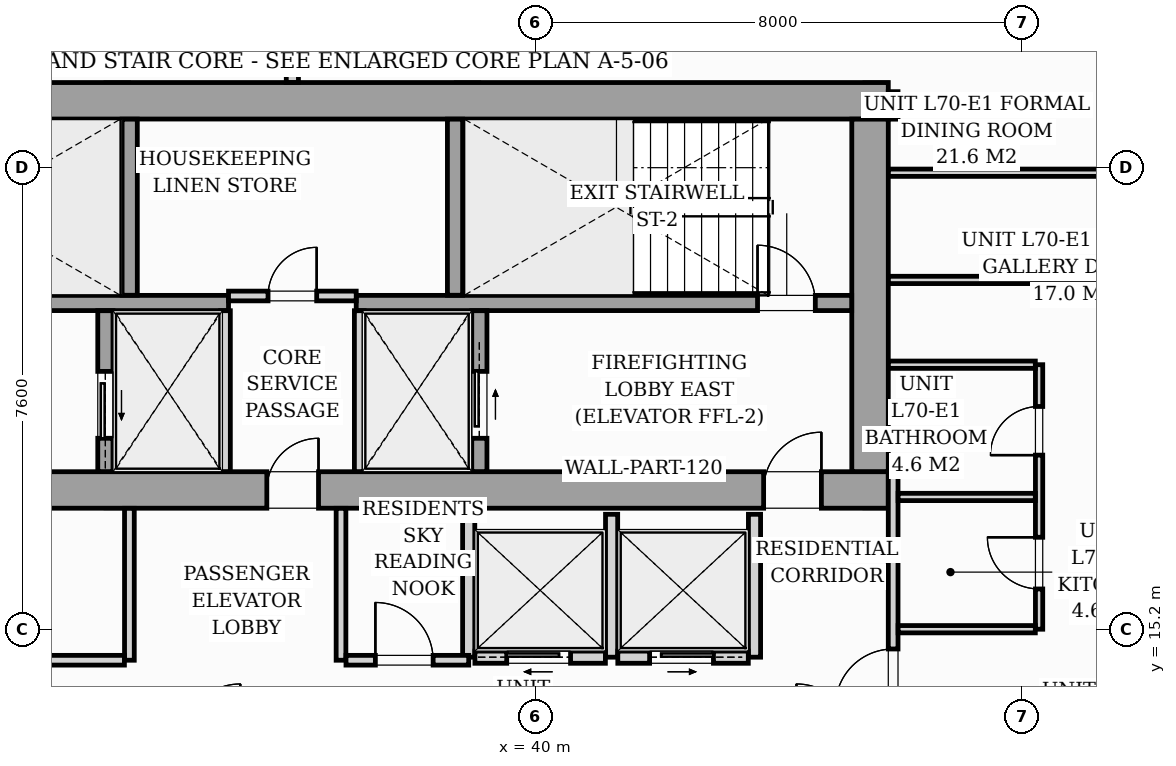
"""IFC4 building model, lengths in metres.
Left out: names, types, materials, properties, quantities, classifications, styles, units other than length and angle.
Written with IfcOpenShell. Run it as: python <this file> out.ifc"""

import sys

from ifc_helpers import new_model, si_unit, direction, frame, frame_2d, origin, origin_2d, place, context, subcontext, project, spatial, rectangle, i_section, extrude, source, transform, mapped, element, fill, save


model = new_model("IFC4")
c1 = context("Model", 3, precision=1e-05, world=origin(), true_north=direction((0.0, 1.0)))
c2 = subcontext(c1, "Body", "Model", "MODEL_VIEW")
j1 = project(units=[si_unit("LENGTHUNIT", "METRE"), si_unit("PLANEANGLEUNIT", "RADIAN")], contexts=[c1])
p1 = place(None, origin())
s1 = spatial("IfcSite", under=j1, at=p1, CompositionType="ELEMENT")
p2 = place(p1, origin())
s2 = spatial("IfcBuilding", under=s1, at=p2, CompositionType="ELEMENT")
p3 = place(p2, frame((0.0, 0.0, 243.0)))
s3 = spatial("IfcBuildingStorey", under=s2, at=p3, CompositionType="ELEMENT", Elevation=243.0)
m1 = source(origin(), c2, "Body", "SweptSolid", [
    extrude(i_section(OverallWidth=0.409, OverallDepth=0.425, WebThickness=0.033, FlangeThickness=0.052, FilletRadius=0.018, at=origin_2d()), origin(), (0.0, 0.0, 1.0), 3.296),
])
for number, where, z_axis, x_axis in (
    (1, (33.12, 17.4, 0.002), (0.0, 0.0, 1.0), (1.0, 0.0, 0.0)),
    (2, (38.88, 17.4, 0.002), (0.0, 0.0, 1.0), (1.0, 0.0, 0.0)),
    (3, (45.6, 17.4, 0.002), (0.0, 0.0, 1.0), (1.0, 0.0, 0.0)),
    (4, (33.12, 24.0, 0.002), (0.0, 0.0, 1.0), (1.0, 0.0, 0.0)),
    (5, (38.88, 24.0, 0.002), (0.0, 0.0, 1.0), (1.0, 0.0, 0.0)),
    (6, (45.6, 24.0, 0.002), (0.0, 0.0, 1.0), (1.0, 0.0, 0.0)),
):
    element("IfcColumn", number, at=place(p3, frame(where, z_axis=z_axis, x_axis=x_axis)), inside=s3, PredefinedType="PILASTER", context=c2, shape_type="MappedRepresentation", body=[
        mapped(m1, transform((0.0, 0.0, 0.0), scale=1.0)),
    ])
p4 = place(p3, frame((26.2, 17.5, 0.0), z_axis=(0.0, 0.0, 1.0), x_axis=(1.0, 0.0, 0.0)))
e7 = element("IfcWall", 7, at=p4, inside=s3, PredefinedType="SHEAR", context=c2, shape_type="SweptSolid", body=[
    extrude(rectangle(XDim=19.6, YDim=0.6, at=frame_2d((9.8, 0.0))), origin(), (0.0, 0.0, 1.0), 3.3),
])
p5 = place(p4, frame((0.95, 0.0, 0.0)))
e8 = element("IfcOpeningElement", 8, at=p5, cuts=e7, PredefinedType="OPENING", context=c2, shape_type="SweptSolid", body=[
    extrude(rectangle(XDim=0.95, YDim=2.06, at=frame_2d((0.475, 1.03))), frame((0.0, 0.31, 0.0), z_axis=(0.0, -1.0, 0.0), x_axis=(1.0, 0.0, 0.0)), (0.0, 0.0, 1.0), 0.62),
])
p6 = place(p4, frame((9.38, 0.0, 0.0)))
e9 = element("IfcOpeningElement", 9, at=p6, cuts=e7, PredefinedType="OPENING", context=c2, shape_type="SweptSolid", body=[
    extrude(rectangle(XDim=0.85, YDim=2.0, at=frame_2d((0.425, 1.0))), frame((0.0, 0.31, 0.0), z_axis=(0.0, -1.0, 0.0), x_axis=(1.0, 0.0, 0.0)), (0.0, 0.0, 1.0), 0.62),
])
p7 = place(p4, frame((17.55, 0.0, 0.0)))
e10 = element("IfcOpeningElement", 10, at=p7, cuts=e7, PredefinedType="OPENING", context=c2, shape_type="SweptSolid", body=[
    extrude(rectangle(XDim=0.95, YDim=2.06, at=frame_2d((0.475, 1.03))), frame((0.0, 0.31, 0.0), z_axis=(0.0, -1.0, 0.0), x_axis=(1.0, 0.0, 0.0)), (0.0, 0.0, 1.0), 0.62),
])
p8 = place(p3, frame((26.2, 23.9, 0.0), z_axis=(0.0, 0.0, 1.0), x_axis=(1.0, 0.0, 0.0)))
e11 = element("IfcWall", 11, at=p8, inside=s3, PredefinedType="SHEAR", context=c2, shape_type="SweptSolid", body=[
    extrude(rectangle(XDim=19.6, YDim=0.6, at=frame_2d((9.8, 0.0))), origin(), (0.0, 0.0, 1.0), 3.3),
])
p9 = place(p3, frame((45.5, 17.802, 0.0), z_axis=(0.0, 0.0, 1.0), x_axis=(0.0, 1.0, 0.0)))
e12 = element("IfcWall", 12, at=p9, inside=s3, PredefinedType="SHEAR", context=c2, shape_type="SweptSolid", body=[
    extrude(rectangle(XDim=5.796, YDim=0.6, at=frame_2d((2.898, 0.0))), origin(), (0.0, 0.0, 1.0), 3.3),
])
p10 = place(p3, frame((26.802, 20.575, 0.0), z_axis=(0.0, 0.0, 1.0), x_axis=(1.0, 0.0, 0.0)))
e13 = element("IfcWall", 13, at=p10, inside=s3, PredefinedType="SOLIDWALL", context=c2, shape_type="SweptSolid", body=[
    extrude(rectangle(XDim=8.148, YDim=0.25, at=frame_2d((4.074, 0.0))), origin(), (0.0, 0.0, 1.0), 3.3),
])
p11 = place(p10, frame((0.298, 0.0, 0.0)))
e14 = element("IfcOpeningElement", 14, at=p11, cuts=e13, PredefinedType="OPENING", context=c2, shape_type="SweptSolid", body=[
    extrude(rectangle(XDim=0.95, YDim=2.06, at=frame_2d((0.475, 1.03))), frame((0.0, 0.135, 0.0), z_axis=(0.0, -1.0, 0.0), x_axis=(1.0, 0.0, 0.0)), (0.0, 0.0, 1.0), 0.27),
])
p12 = place(p3, frame((37.05, 20.575, 0.0), z_axis=(0.0, 0.0, 1.0), x_axis=(1.0, 0.0, 0.0)))
e15 = element("IfcWall", 15, at=p12, inside=s3, PredefinedType="SOLIDWALL", context=c2, shape_type="SweptSolid", body=[
    extrude(rectangle(XDim=8.148, YDim=0.25, at=frame_2d((4.074, 0.0))), origin(), (0.0, 0.0, 1.0), 3.3),
])
p13 = place(p12, frame((6.6, 0.0, 0.0)))
e16 = element("IfcOpeningElement", 16, at=p13, cuts=e15, PredefinedType="OPENING", context=c2, shape_type="SweptSolid", body=[
    extrude(rectangle(XDim=0.95, YDim=2.06, at=frame_2d((0.475, 1.03))), frame((0.0, 0.135, 0.0), z_axis=(0.0, -1.0, 0.0), x_axis=(1.0, 0.0, 0.0)), (0.0, 0.0, 1.0), 0.27),
])
for number, where, z_axis, x_axis in (
    (17, (33.325, 20.702, 0.0), (0.0, 0.0, 1.0), (0.0, 1.0, 0.0)),
    (18, (38.675, 20.702, 0.0), (0.0, 0.0, 1.0), (0.0, 1.0, 0.0)),
):
    element("IfcWall", number, at=place(p3, frame(where, z_axis=z_axis, x_axis=x_axis)), inside=s3, PredefinedType="SOLIDWALL", context=c2, shape_type="SweptSolid", body=[
        extrude(rectangle(XDim=2.896, YDim=0.25, at=frame_2d((1.448, 0.0))), origin(), (0.0, 0.0, 1.0), 3.3),
    ])
p14 = place(p3, frame((32.925, 17.802, 0.0), z_axis=(0.0, 0.0, 1.0), x_axis=(0.0, 1.0, 0.0)))
e19 = element("IfcWall", 19, at=p14, inside=s3, PredefinedType="SOLIDWALL", context=c2, shape_type="SweptSolid", body=[
    extrude(rectangle(XDim=2.646, YDim=0.25, at=frame_2d((1.323, 0.0))), origin(), (0.0, 0.0, 1.0), 3.3),
])
p15 = place(p14, frame((0.548, 0.0, 0.0)))
e20 = element("IfcOpeningElement", 20, at=p15, cuts=e19, PredefinedType="OPENING", context=c2, shape_type="SweptSolid", body=[
    extrude(rectangle(XDim=1.1, YDim=2.08, at=frame_2d((0.55, 1.04))), frame((0.0, 0.135, 0.0), z_axis=(0.0, -1.0, 0.0), x_axis=(1.0, 0.0, 0.0)), (0.0, 0.0, 1.0), 0.27),
])
for number, where, z_axis, x_axis in (
    (21, (34.9, 17.802, 0.0), (0.0, 0.0, 1.0), (0.0, 1.0, 0.0)),
    (22, (37.1, 17.802, 0.0), (0.0, 0.0, 1.0), (0.0, 1.0, 0.0)),
):
    element("IfcWall", number, at=place(p3, frame(where, z_axis=z_axis, x_axis=x_axis)), inside=s3, PredefinedType="PARTITIONING", context=c2, shape_type="SweptSolid", body=[
        extrude(rectangle(XDim=2.646, YDim=0.16, at=frame_2d((1.323, 0.0))), origin(), (0.0, 0.0, 1.0), 3.04),
    ])
p16 = place(p3, frame((39.075, 17.802, 0.0), z_axis=(0.0, 0.0, 1.0), x_axis=(0.0, 1.0, 0.0)))
e23 = element("IfcWall", 23, at=p16, inside=s3, PredefinedType="SOLIDWALL", context=c2, shape_type="SweptSolid", body=[
    extrude(rectangle(XDim=2.646, YDim=0.25, at=frame_2d((1.323, 0.0))), origin(), (0.0, 0.0, 1.0), 3.3),
])
p17 = place(p16, frame((0.548, 0.0, 0.0)))
e24 = element("IfcOpeningElement", 24, at=p17, cuts=e23, PredefinedType="OPENING", context=c2, shape_type="SweptSolid", body=[
    extrude(rectangle(XDim=1.1, YDim=2.08, at=frame_2d((0.55, 1.04))), frame((0.0, 0.135, 0.0), z_axis=(0.0, -1.0, 0.0), x_axis=(1.0, 0.0, 0.0)), (0.0, 0.0, 1.0), 0.27),
])
p18 = place(p3, frame((34.95, 20.69, 0.0), z_axis=(0.0, 0.0, 1.0), x_axis=(1.0, 0.0, 0.0)))
e25 = element("IfcWall", 25, at=p18, inside=s3, PredefinedType="PARTITIONING", context=c2, shape_type="SweptSolid", body=[
    extrude(rectangle(XDim=2.1, YDim=0.16, at=frame_2d((1.05, 0.0))), origin(), (0.0, 0.0, 1.0), 3.04),
])
p19 = place(p18, frame((0.65, 0.0, 0.0)))
e26 = element("IfcOpeningElement", 26, at=p19, cuts=e25, PredefinedType="OPENING", context=c2, shape_type="SweptSolid", body=[
    extrude(rectangle(XDim=0.8, YDim=2.05, at=frame_2d((0.4, 1.025))), frame((0.0, 0.09, 0.0), z_axis=(0.0, -1.0, 0.0), x_axis=(1.0, 0.0, 0.0)), (0.0, 0.0, 1.0), 0.18),
])
for number, where, z_axis, x_axis in (
    (27, (38.9, 14.75, 0.0), (0.0, 0.0, 1.0), (0.0, 1.0, 0.0)),
    (28, (41.25, 14.75, 0.0), (0.0, 0.0, 1.0), (0.0, 1.0, 0.0)),
    (29, (43.6, 14.75, 0.0), (0.0, 0.0, 1.0), (0.0, 1.0, 0.0)),
):
    element("IfcWall", number, at=place(p3, frame(where, z_axis=z_axis, x_axis=x_axis)), inside=s3, PredefinedType="PARTITIONING", context=c2, shape_type="SweptSolid", body=[
        extrude(rectangle(XDim=2.35, YDim=0.2, at=frame_2d((1.175, 0.0))), origin(), (0.0, 0.0, 1.0), 3.04),
    ])
p20 = place(p3, frame((39.002, 14.75, 0.0), z_axis=(0.0, 0.0, 1.0), x_axis=(1.0, 0.0, 0.0)))
e30 = element("IfcWall", 30, at=p20, inside=s3, PredefinedType="PARTITIONING", context=c2, shape_type="SweptSolid", body=[
    extrude(rectangle(XDim=2.146, YDim=0.2, at=frame_2d((1.073, 0.0))), origin(), (0.0, 0.0, 1.0), 3.04),
])
p21 = place(p20, frame((0.523, 0.0, 0.0)))
e31 = element("IfcOpeningElement", 31, at=p21, cuts=e30, PredefinedType="OPENING", context=c2, shape_type="SweptSolid", body=[
    extrude(rectangle(XDim=1.05, YDim=2.08, at=frame_2d((0.525, 1.04))), frame((0.0, 0.11, 0.0), z_axis=(0.0, -1.0, 0.0), x_axis=(1.0, 0.0, 0.0)), (0.0, 0.0, 1.0), 0.22),
])
p22 = place(p3, frame((41.352, 14.75, 0.0), z_axis=(0.0, 0.0, 1.0), x_axis=(1.0, 0.0, 0.0)))
e32 = element("IfcWall", 32, at=p22, inside=s3, PredefinedType="PARTITIONING", context=c2, shape_type="SweptSolid", body=[
    extrude(rectangle(XDim=2.146, YDim=0.2, at=frame_2d((1.073, 0.0))), origin(), (0.0, 0.0, 1.0), 3.04),
])
p23 = place(p22, frame((0.523, 0.0, 0.0)))
e33 = element("IfcOpeningElement", 33, at=p23, cuts=e32, PredefinedType="OPENING", context=c2, shape_type="SweptSolid", body=[
    extrude(rectangle(XDim=1.05, YDim=2.08, at=frame_2d((0.525, 1.04))), frame((0.0, 0.11, 0.0), z_axis=(0.0, -1.0, 0.0), x_axis=(1.0, 0.0, 0.0)), (0.0, 0.0, 1.0), 0.22),
])
p24 = place(p3, frame((45.88, 13.442, 0.0), z_axis=(0.0, 0.0, 1.0), x_axis=(0.0, 1.0, 0.0)))
e34 = element("IfcWall", 34, at=p24, inside=s3, PredefinedType="PARTITIONING", context=c2, shape_type="SweptSolid", body=[
    extrude(rectangle(XDim=4.36, YDim=0.16, at=frame_2d((2.18, 0.0))), origin(), (0.0, 0.0, 1.0), 3.04),
])
p25 = place(p24, frame((0.493, 0.0, 0.0)))
e35 = element("IfcOpeningElement", 35, at=p25, cuts=e34, PredefinedType="OPENING", context=c2, shape_type="SweptSolid", body=[
    extrude(rectangle(XDim=0.95, YDim=2.06, at=frame_2d((0.475, 1.03))), frame((0.0, 0.09, 0.0), z_axis=(0.0, -1.0, 0.0), x_axis=(1.0, 0.0, 0.0)), (0.0, 0.0, 1.0), 0.18),
])
p26 = place(p3, frame((45.88, 23.598, 0.0), z_axis=(0.0, 0.0, 1.0), x_axis=(0.0, 1.0, 0.0)))
e36 = element("IfcWall", 36, at=p26, inside=s3, PredefinedType="PARTITIONING", context=c2, shape_type="SweptSolid", body=[
    extrude(rectangle(XDim=0.452, YDim=0.16, at=frame_2d((0.226, 0.0))), origin(), (0.0, 0.0, 1.0), 3.04),
])
p27 = place(p3, frame((36.0, 24.202, 0.0), z_axis=(0.0, 0.0, 1.0), x_axis=(0.0, 1.0, 0.0)))
e37 = element("IfcWall", 37, at=p27, inside=s3, PredefinedType="PARTITIONING", context=c2, shape_type="SweptSolid", body=[
    extrude(rectangle(XDim=2.363, YDim=0.2, at=frame_2d((1.182, 0.0))), origin(), (0.0, 0.0, 1.0), 3.04),
])
p28 = place(p3, frame((48.28, 15.21, 0.0), z_axis=(0.0, 0.0, 1.0), x_axis=(0.0, 1.0, 0.0)))
e38 = element("IfcWall", 38, at=p28, inside=s3, PredefinedType="PARTITIONING", context=c2, shape_type="SweptSolid", body=[
    extrude(rectangle(XDim=4.35, YDim=0.12, at=frame_2d((2.175, 0.0))), origin(), (0.0, 0.0, 1.0), 3.04),
])
p29 = place(p28, frame((0.662, 0.0, 0.0)))
e39 = element("IfcOpeningElement", 39, at=p29, cuts=e38, PredefinedType="OPENING", context=c2, shape_type="SweptSolid", body=[
    extrude(rectangle(XDim=0.85, YDim=2.05, at=frame_2d((0.425, 1.025))), frame((0.0, 0.07, 0.0), z_axis=(0.0, -1.0, 0.0), x_axis=(1.0, 0.0, 0.0)), (0.0, 0.0, 1.0), 0.14),
])
p30 = place(p28, frame((2.863, 0.0, 0.0)))
e40 = element("IfcOpeningElement", 40, at=p30, cuts=e38, PredefinedType="OPENING", context=c2, shape_type="SweptSolid", body=[
    extrude(rectangle(XDim=0.8, YDim=2.02, at=frame_2d((0.4, 1.01))), frame((0.0, 0.07, 0.0), z_axis=(0.0, -1.0, 0.0), x_axis=(1.0, 0.0, 0.0)), (0.0, 0.0, 1.0), 0.14),
])
p31 = place(p3, frame((45.962, 17.385, 0.0), z_axis=(0.0, 0.0, 1.0), x_axis=(1.0, 0.0, 0.0)))
e41 = element("IfcWall", 41, at=p31, inside=s3, PredefinedType="PARTITIONING", context=c2, shape_type="SweptSolid", body=[
    extrude(rectangle(XDim=2.256, YDim=0.12, at=frame_2d((1.128, 0.0))), origin(), (0.0, 0.0, 1.0), 2.381),
])
p32 = place(p3, frame((45.962, 15.21, 0.0), z_axis=(0.0, 0.0, 1.0), x_axis=(1.0, 0.0, 0.0)))
e42 = element("IfcWall", 42, at=p32, inside=s3, PredefinedType="PARTITIONING", context=c2, shape_type="SweptSolid", body=[
    extrude(rectangle(XDim=2.256, YDim=0.12, at=frame_2d((1.128, 0.0))), origin(), (0.0, 0.0, 1.0), 3.04),
])
p33 = place(p3, frame((45.802, 19.56, 0.0), z_axis=(0.0, 0.0, 1.0), x_axis=(1.0, 0.0, 0.0)))
e43 = element("IfcWall", 43, at=p33, inside=s3, PredefinedType="PARTITIONING", context=c2, shape_type="SweptSolid", body=[
    extrude(rectangle(XDim=2.416, YDim=0.12, at=frame_2d((1.208, 0.0))), origin(), (0.0, 0.0, 1.0), 3.04),
])
p34 = place(p3, frame((45.802, 22.717, 0.0), z_axis=(0.0, 0.0, 1.0), x_axis=(1.0, 0.0, 0.0)))
e44 = element("IfcWall", 44, at=p34, inside=s3, PredefinedType="PARTITIONING", context=c2, shape_type="SweptSolid", body=[
    extrude(rectangle(XDim=9.406, YDim=0.12, at=frame_2d((4.703, 0.0))), origin(), (0.0, 0.0, 1.0), 3.04),
])
p35 = place(p34, frame((4.397, 0.0, 0.0)))
e45 = element("IfcOpeningElement", 45, at=p35, cuts=e44, PredefinedType="OPENING", context=c2, shape_type="SweptSolid", body=[
    extrude(rectangle(XDim=0.85, YDim=2.05, at=frame_2d((0.425, 1.025))), frame((0.0, 0.07, 0.0), z_axis=(0.0, -1.0, 0.0), x_axis=(1.0, 0.0, 0.0)), (0.0, 0.0, 1.0), 0.14),
])
p36 = place(p3, frame((45.802, 20.954, 0.0), z_axis=(0.0, 0.0, 1.0), x_axis=(1.0, 0.0, 0.0)))
e46 = element("IfcWall", 46, at=p36, inside=s3, PredefinedType="PARTITIONING", context=c2, shape_type="SweptSolid", body=[
    extrude(rectangle(XDim=10.683, YDim=0.12, at=frame_2d((5.342, 0.0))), origin(), (0.0, 0.0, 1.0), 3.04),
])
p37 = place(p36, frame((5.062, 0.0, 0.0)))
e47 = element("IfcOpeningElement", 47, at=p37, cuts=e46, PredefinedType="OPENING", context=c2, shape_type="SweptSolid", body=[
    extrude(rectangle(XDim=0.85, YDim=2.05, at=frame_2d((0.425, 1.025))), frame((0.0, 0.07, 0.0), z_axis=(0.0, -1.0, 0.0), x_axis=(1.0, 0.0, 0.0)), (0.0, 0.0, 1.0), 0.14),
])
p38 = place(p3, frame((33.32, 14.7, 0.0), z_axis=(0.0, 0.0, 1.0), x_axis=(0.0, 1.0, 0.0)))
e48 = element("IfcWall", 48, at=p38, inside=s3, PredefinedType="PARTITIONING", context=c2, shape_type="SweptSolid", body=[
    extrude(rectangle(XDim=2.498, YDim=0.16, at=frame_2d((1.249, 0.0))), origin(), (0.0, 0.0, 1.0), 3.04),
])
p39 = place(p3, frame((28.442, 14.7, 0.0), z_axis=(0.0, 0.0, 1.0), x_axis=(1.0, 0.0, 0.0)))
e49 = element("IfcWall", 49, at=p39, inside=s3, PredefinedType="PARTITIONING", context=c2, shape_type="SweptSolid", body=[
    extrude(rectangle(XDim=4.796, YDim=0.16, at=frame_2d((2.398, 0.0))), origin(), (0.0, 0.0, 1.0), 2.55),
])
p40 = place(p39, frame((1.923, 0.0, 0.0)))
e50 = element("IfcOpeningElement", 50, at=p40, cuts=e49, PredefinedType="OPENING", context=c2, shape_type="SweptSolid", body=[
    extrude(rectangle(XDim=0.95, YDim=2.06, at=frame_2d((0.475, 1.03))), frame((0.0, 0.09, 0.0), z_axis=(0.0, -1.0, 0.0), x_axis=(1.0, 0.0, 0.0)), (0.0, 0.0, 1.0), 0.18),
])
p41 = place(p3, frame((36.8, 14.7, 0.0), z_axis=(0.0, 0.0, 1.0), x_axis=(0.0, 1.0, 0.0)))
e51 = element("IfcWall", 51, at=p41, inside=s3, PredefinedType="PARTITIONING", context=c2, shape_type="SweptSolid", body=[
    extrude(rectangle(XDim=2.498, YDim=0.16, at=frame_2d((1.249, 0.0))), origin(), (0.0, 0.0, 1.0), 3.04),
])
p42 = place(p3, frame((36.882, 14.7, 0.0), z_axis=(0.0, 0.0, 1.0), x_axis=(1.0, 0.0, 0.0)))
e52 = element("IfcWall", 52, at=p42, inside=s3, PredefinedType="PARTITIONING", context=c2, shape_type="SweptSolid", body=[
    extrude(rectangle(XDim=2.018, YDim=0.16, at=frame_2d((1.009, 0.0))), origin(), (0.0, 0.0, 1.0), 3.04),
])
p43 = place(p42, frame((0.483, 0.0, 0.0)))
e53 = element("IfcOpeningElement", 53, at=p43, cuts=e52, PredefinedType="OPENING", context=c2, shape_type="SweptSolid", body=[
    extrude(rectangle(XDim=0.95, YDim=2.06, at=frame_2d((0.475, 1.03))), frame((0.0, 0.09, 0.0), z_axis=(0.0, -1.0, 0.0), x_axis=(1.0, 0.0, 0.0)), (0.0, 0.0, 1.0), 0.18),
])
m2 = source(origin(), c2, "Body", "SweptSolid", [
    extrude(rectangle(XDim=0.85, YDim=2.0, at=frame_2d((0.425, 1.0))), frame((0.0, 0.025, 0.0), z_axis=(0.0, -1.0, 0.0), x_axis=(1.0, 0.0, 0.0)), (0.0, 0.0, 1.0), 0.05),
])
p44 = place(p6, origin())
e54 = element("IfcDoor", 54, at=p44, inside=s3, OperationType="SINGLE_SWING_RIGHT", PredefinedType="DOOR", context=c2, shape_type="MappedRepresentation", body=[
    mapped(m2, transform((0.0, 0.0, 0.0), scale=1.0)),
])
fill(e9, e54)
m3 = source(origin(), c2, "Body", "SweptSolid", [
    extrude(rectangle(XDim=0.95, YDim=2.06, at=frame_2d((0.475, 1.03))), frame((0.0, 0.025, 0.0), z_axis=(0.0, -1.0, 0.0), x_axis=(1.0, 0.0, 0.0)), (0.0, 0.0, 1.0), 0.05),
])
p45 = place(p7, origin())
e55 = element("IfcDoor", 55, at=p45, inside=s3, OperationType="SINGLE_SWING_RIGHT", PredefinedType="DOOR", context=c2, shape_type="MappedRepresentation", body=[
    mapped(m3, transform((0.0, 0.0, 0.0), scale=1.0)),
])
fill(e10, e55)
p46 = place(p13, origin())
e56 = element("IfcDoor", 56, at=p46, inside=s3, OperationType="SINGLE_SWING_LEFT", PredefinedType="DOOR", context=c2, shape_type="MappedRepresentation", body=[
    mapped(m3, transform((0.0, 0.0, 0.0), scale=1.0)),
])
fill(e16, e56)
m4 = source(origin(), c2, "Body", "SweptSolid", [
    extrude(rectangle(XDim=1.1, YDim=2.08, at=frame_2d((0.55, 1.04))), frame((0.0, 0.025, 0.0), z_axis=(0.0, -1.0, 0.0), x_axis=(1.0, 0.0, 0.0)), (0.0, 0.0, 1.0), 0.05),
])
p47 = place(p15, origin())
e57 = element("IfcDoor", 57, at=p47, inside=s3, OperationType="SLIDING_TO_LEFT", PredefinedType="DOOR", context=c2, shape_type="MappedRepresentation", body=[
    mapped(m4, transform((0.0, 0.0, 0.0), scale=1.0)),
])
fill(e20, e57)
p48 = place(p17, origin())
e58 = element("IfcDoor", 58, at=p48, inside=s3, OperationType="SLIDING_TO_RIGHT", PredefinedType="DOOR", context=c2, shape_type="MappedRepresentation", body=[
    mapped(m4, transform((0.0, 0.0, 0.0), scale=1.0)),
])
fill(e24, e58)
m5 = source(origin(), c2, "Body", "SweptSolid", [
    extrude(rectangle(XDim=0.8, YDim=2.05, at=frame_2d((0.4, 1.025))), frame((0.0, 0.025, 0.0), z_axis=(0.0, -1.0, 0.0), x_axis=(1.0, 0.0, 0.0)), (0.0, 0.0, 1.0), 0.05),
])
p49 = place(p19, origin())
e59 = element("IfcDoor", 59, at=p49, inside=s3, OperationType="SINGLE_SWING_RIGHT", PredefinedType="DOOR", context=c2, shape_type="MappedRepresentation", body=[
    mapped(m5, transform((0.0, 0.0, 0.0), scale=1.0)),
])
fill(e26, e59)
m6 = source(origin(), c2, "Body", "SweptSolid", [
    extrude(rectangle(XDim=1.05, YDim=2.08, at=frame_2d((0.525, 1.04))), frame((0.0, 0.025, 0.0), z_axis=(0.0, -1.0, 0.0), x_axis=(1.0, 0.0, 0.0)), (0.0, 0.0, 1.0), 0.05),
])
p50 = place(p21, origin())
e60 = element("IfcDoor", 60, at=p50, inside=s3, OperationType="SLIDING_TO_LEFT", PredefinedType="DOOR", context=c2, shape_type="MappedRepresentation", body=[
    mapped(m6, transform((0.0, 0.0, 0.0), scale=1.0)),
])
fill(e31, e60)
p51 = place(p23, origin())
e61 = element("IfcDoor", 61, at=p51, inside=s3, OperationType="SLIDING_TO_RIGHT", PredefinedType="DOOR", context=c2, shape_type="MappedRepresentation", body=[
    mapped(m6, transform((0.0, 0.0, 0.0), scale=1.0)),
])
fill(e33, e61)
m7 = source(origin(), c2, "Body", "SweptSolid", [
    extrude(rectangle(XDim=0.95, YDim=2.06, at=frame_2d((0.475, 1.03))), frame((0.0, 0.025, 0.0), z_axis=(0.0, -1.0, 0.0), x_axis=(1.0, 0.0, 0.0)), (0.0, 0.0, 1.0), 0.05),
])
p52 = place(p25, origin())
e62 = element("IfcDoor", 62, at=p52, inside=s3, OperationType="SINGLE_SWING_LEFT", PredefinedType="DOOR", context=c2, shape_type="MappedRepresentation", body=[
    mapped(m7, transform((0.0, 0.0, 0.0), scale=1.0)),
])
fill(e35, e62)
m8 = source(origin(), c2, "Body", "SweptSolid", [
    extrude(rectangle(XDim=0.85, YDim=2.05, at=frame_2d((0.425, 1.025))), frame((0.0, 0.025, 0.0), z_axis=(0.0, -1.0, 0.0), x_axis=(1.0, 0.0, 0.0)), (0.0, 0.0, 1.0), 0.05),
])
p53 = place(p29, origin())
e63 = element("IfcDoor", 63, at=p53, inside=s3, OperationType="SINGLE_SWING_RIGHT", PredefinedType="DOOR", context=c2, shape_type="MappedRepresentation", body=[
    mapped(m8, transform((0.0, 0.0, 0.0), scale=1.0)),
])
fill(e39, e63)
m9 = source(origin(), c2, "Body", "SweptSolid", [
    extrude(rectangle(XDim=0.8, YDim=2.02, at=frame_2d((0.4, 1.01))), frame((0.0, 0.025, 0.0), z_axis=(0.0, -1.0, 0.0), x_axis=(1.0, 0.0, 0.0)), (0.0, 0.0, 1.0), 0.05),
])
p54 = place(p30, origin())
e64 = element("IfcDoor", 64, at=p54, inside=s3, OperationType="SINGLE_SWING_LEFT", PredefinedType="DOOR", context=c2, shape_type="MappedRepresentation", body=[
    mapped(m9, transform((0.0, 0.0, 0.0), scale=1.0)),
])
fill(e40, e64)
p55 = place(p43, origin())
e65 = element("IfcDoor", 65, at=p55, inside=s3, OperationType="SINGLE_SWING_LEFT", PredefinedType="DOOR", context=c2, shape_type="MappedRepresentation", body=[
    mapped(m7, transform((0.0, 0.0, 0.0), scale=1.0)),
])
fill(e53, e65)
save(model, sys.argv[1])
